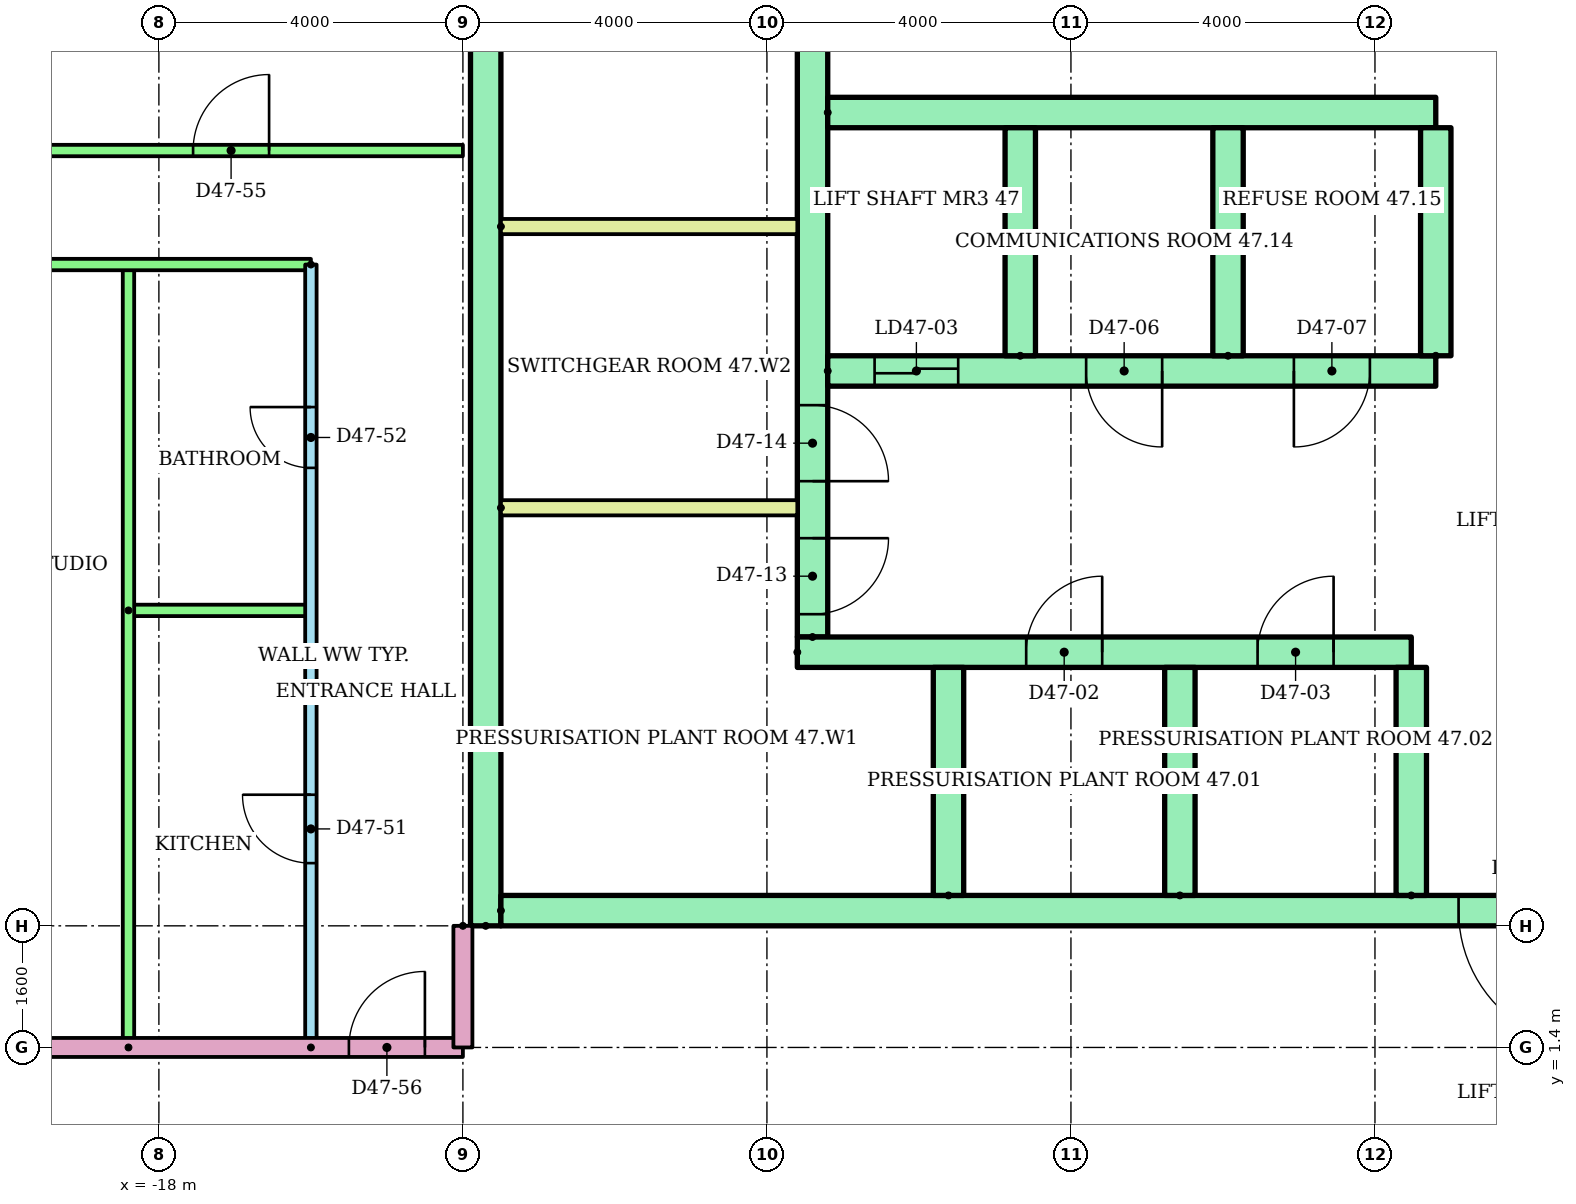
"""IFC4 building model, lengths in metres.
Left out: names, types, materials, properties, quantities, classifications, styles, units other than length and angle.
Written with IfcOpenShell. Run it as: python <this file> out.ifc"""

import sys

from ifc_helpers import new_model, si_unit, direction, frame, frame_2d, origin, place, context, subcontext, project, spatial, rectangle, extrude, element, fill, save


model = new_model("IFC4")
c1 = context("Model", 3, precision=1e-05, world=origin(), true_north=direction((0.0, 1.0)))
c2 = subcontext(c1, "Body", "Model", "MODEL_VIEW")
j1 = project(units=[si_unit("LENGTHUNIT", "METRE"), si_unit("PLANEANGLEUNIT", "RADIAN")], contexts=[c1])
p1 = place(None, origin())
s1 = spatial("IfcSite", under=j1, at=p1, CompositionType="ELEMENT")
p2 = place(p1, origin())
s2 = spatial("IfcBuilding", under=s1, at=p2, CompositionType="ELEMENT")
p3 = place(p2, frame((0.0, 0.0, 181.3)))
s3 = spatial("IfcBuildingStorey", under=s2, at=p3, CompositionType="ELEMENT", Elevation=181.3)
p4 = place(p3, frame((-13.7, 3.0, 0.0), z_axis=(0.0, 0.0, 1.0), x_axis=(0.0, 1.0, 0.0)))
e1 = element("IfcWall", 1, at=p4, inside=s3, PredefinedType="SHEAR", context=c2, shape_type="SweptSolid", body=[
    extrude(rectangle(XDim=17.0, YDim=0.4, at=frame_2d((8.5, 0.0))), origin(), (0.0, 0.0, 1.0), 2.92),
])
p5 = place(p3, frame((-9.4, 6.8, 0.0), z_axis=(0.0, 0.0, 1.0), x_axis=(0.0, 1.0, 0.0)))
e2 = element("IfcWall", 2, at=p5, inside=s3, PredefinedType="SHEAR", context=c2, shape_type="SweptSolid", body=[
    extrude(rectangle(XDim=12.7, YDim=0.4, at=frame_2d((6.35, 0.0))), origin(), (0.0, 0.0, 1.0), 2.92),
])
p6 = place(p5, frame((0.3, 0.0, 0.0)))
e3 = element("IfcOpeningElement", 3, at=p6, cuts=e2, PredefinedType="OPENING", context=c2, shape_type="SweptSolid", body=[
    extrude(rectangle(XDim=1.0, YDim=2.1, at=frame_2d((0.5, 1.05))), frame((0.0, 0.21, 0.0), z_axis=(0.0, -1.0, 0.0), x_axis=(1.0, 0.0, 0.0)), (0.0, 0.0, 1.0), 0.42),
])
p7 = place(p5, frame((2.05, 0.0, 0.0)))
e4 = element("IfcOpeningElement", 4, at=p7, cuts=e2, PredefinedType="OPENING", context=c2, shape_type="SweptSolid", body=[
    extrude(rectangle(XDim=1.0, YDim=2.1, at=frame_2d((0.5, 1.05))), frame((0.0, 0.21, 0.0), z_axis=(0.0, -1.0, 0.0), x_axis=(1.0, 0.0, 0.0)), (0.0, 0.0, 1.0), 0.42),
])
p8 = place(p5, frame((7.925, 0.0, 0.0)))
e5 = element("IfcOpeningElement", 5, at=p8, cuts=e2, PredefinedType="OPENING", context=c2, shape_type="SweptSolid", body=[
    extrude(rectangle(XDim=1.0, YDim=2.1, at=frame_2d((0.5, 1.05))), frame((0.0, 0.21, 0.0), z_axis=(0.0, -1.0, 0.0), x_axis=(1.0, 0.0, 0.0)), (0.0, 0.0, 1.0), 0.42),
])
p9 = place(p3, frame((-13.5, 3.2, 0.0)))
e6 = element("IfcWall", 6, at=p9, inside=s3, PredefinedType="SHEAR", context=c2, shape_type="SweptSolid", body=[
    extrude(rectangle(XDim=27.0, YDim=0.4, at=frame_2d((13.5, 0.0))), origin(), (0.0, 0.0, 1.0), 2.92),
])
p10 = place(p9, frame((22.083, 0.0, 0.0)))
e7 = element("IfcOpeningElement", 7, at=p10, cuts=e6, PredefinedType="OPENING", context=c2, shape_type="SweptSolid", body=[
    extrude(rectangle(XDim=1.1, YDim=2.1, at=frame_2d((0.55, 1.05))), frame((0.0, 0.21, 0.0), z_axis=(0.0, -1.0, 0.0), x_axis=(1.0, 0.0, 0.0)), (0.0, 0.0, 1.0), 0.42),
])
p11 = place(p9, frame((25.128, 0.0, 0.0)))
e8 = element("IfcOpeningElement", 8, at=p11, cuts=e6, PredefinedType="OPENING", context=c2, shape_type="SweptSolid", body=[
    extrude(rectangle(XDim=1.1, YDim=2.1, at=frame_2d((0.55, 1.05))), frame((0.0, 0.21, 0.0), z_axis=(0.0, -1.0, 0.0), x_axis=(1.0, 0.0, 0.0)), (0.0, 0.0, 1.0), 0.42),
])
p12 = place(p9, frame((12.6, 0.0, 0.0)))
e9 = element("IfcOpeningElement", 9, at=p12, cuts=e6, PredefinedType="OPENING", context=c2, shape_type="SweptSolid", body=[
    extrude(rectangle(XDim=1.8, YDim=2.1, at=frame_2d((0.9, 1.05))), frame((0.0, 0.21, 0.0), z_axis=(0.0, -1.0, 0.0), x_axis=(1.0, 0.0, 0.0)), (0.0, 0.0, 1.0), 0.42),
])
p13 = place(p3, frame((-9.6, 6.6, 0.0)))
e10 = element("IfcWall", 10, at=p13, inside=s3, PredefinedType="SHEAR", context=c2, shape_type="SweptSolid", body=[
    extrude(rectangle(XDim=8.078, YDim=0.4, at=frame_2d((4.039, 0.0))), origin(), (0.0, 0.0, 1.0), 2.92),
])
p14 = place(p13, frame((3.011, 0.0, 0.0)))
e11 = element("IfcOpeningElement", 11, at=p14, cuts=e10, PredefinedType="OPENING", context=c2, shape_type="SweptSolid", body=[
    extrude(rectangle(XDim=1.0, YDim=2.1, at=frame_2d((0.5, 1.05))), frame((0.0, 0.21, 0.0), z_axis=(0.0, -1.0, 0.0), x_axis=(1.0, 0.0, 0.0)), (0.0, 0.0, 1.0), 0.42),
])
p15 = place(p13, frame((6.056, 0.0, 0.0)))
e12 = element("IfcOpeningElement", 12, at=p15, cuts=e10, PredefinedType="OPENING", context=c2, shape_type="SweptSolid", body=[
    extrude(rectangle(XDim=1.0, YDim=2.1, at=frame_2d((0.5, 1.05))), frame((0.0, 0.21, 0.0), z_axis=(0.0, -1.0, 0.0), x_axis=(1.0, 0.0, 0.0)), (0.0, 0.0, 1.0), 0.42),
])
for number, where, z_axis, x_axis in (
    (13, (-7.611, 3.4, 0.0), (0.0, 0.0, 1.0), (0.0, 1.0, 0.0)),
    (14, (-4.567, 3.4, 0.0), (0.0, 0.0, 1.0), (0.0, 1.0, 0.0)),
    (15, (-1.522, 3.4, 0.0), (0.0, 0.0, 1.0), (0.0, 1.0, 0.0)),
):
    element("IfcWall", number, at=place(p3, frame(where, z_axis=z_axis, x_axis=x_axis)), inside=s3, PredefinedType="SHEAR", context=c2, shape_type="SweptSolid", body=[
        extrude(rectangle(XDim=3.0, YDim=0.4, at=frame_2d((1.5, 0.0))), origin(), (0.0, 0.0, 1.0), 2.92),
    ])
p16 = place(p3, frame((-9.2, 10.3, 0.0)))
e16 = element("IfcWall", 16, at=p16, inside=s3, PredefinedType="SHEAR", context=c2, shape_type="SweptSolid", body=[
    extrude(rectangle(XDim=8.0, YDim=0.4, at=frame_2d((4.0, 0.0))), origin(), (0.0, 0.0, 1.0), 2.92),
])
p17 = place(p16, frame((0.617, 0.0, 0.0)))
e17 = element("IfcOpeningElement", 17, at=p17, cuts=e16, PredefinedType="OPENING", context=c2, shape_type="SweptSolid", body=[
    extrude(rectangle(XDim=1.1, YDim=2.1, at=frame_2d((0.55, 1.05))), frame((0.0, 0.21, 0.0), z_axis=(0.0, -1.0, 0.0), x_axis=(1.0, 0.0, 0.0)), (0.0, 0.0, 1.0), 0.42),
])
p18 = place(p16, frame((3.4, 0.0, 0.0)))
e18 = element("IfcOpeningElement", 18, at=p18, cuts=e16, PredefinedType="OPENING", context=c2, shape_type="SweptSolid", body=[
    extrude(rectangle(XDim=1.0, YDim=2.1, at=frame_2d((0.5, 1.05))), frame((0.0, 0.21, 0.0), z_axis=(0.0, -1.0, 0.0), x_axis=(1.0, 0.0, 0.0)), (0.0, 0.0, 1.0), 0.42),
])
p19 = place(p16, frame((6.133, 0.0, 0.0)))
e19 = element("IfcOpeningElement", 19, at=p19, cuts=e16, PredefinedType="OPENING", context=c2, shape_type="SweptSolid", body=[
    extrude(rectangle(XDim=1.0, YDim=2.1, at=frame_2d((0.5, 1.05))), frame((0.0, 0.21, 0.0), z_axis=(0.0, -1.0, 0.0), x_axis=(1.0, 0.0, 0.0)), (0.0, 0.0, 1.0), 0.42),
])
p20 = place(p3, frame((-9.2, 13.7, 0.0)))
e20 = element("IfcWall", 20, at=p20, inside=s3, PredefinedType="SHEAR", context=c2, shape_type="SweptSolid", body=[
    extrude(rectangle(XDim=8.0, YDim=0.4, at=frame_2d((4.0, 0.0))), origin(), (0.0, 0.0, 1.0), 2.92),
])
for number, where, z_axis, x_axis in (
    (21, (-6.667, 10.5, 0.0), (0.0, 0.0, 1.0), (0.0, 1.0, 0.0)),
    (22, (-3.933, 10.5, 0.0), (0.0, 0.0, 1.0), (0.0, 1.0, 0.0)),
    (23, (-1.2, 10.5, 0.0), (0.0, 0.0, 1.0), (0.0, 1.0, 0.0)),
):
    element("IfcWall", number, at=place(p3, frame(where, z_axis=z_axis, x_axis=x_axis)), inside=s3, PredefinedType="SHEAR", context=c2, shape_type="SweptSolid", body=[
        extrude(rectangle(XDim=3.0, YDim=0.4, at=frame_2d((1.5, 0.0))), origin(), (0.0, 0.0, 1.0), 2.92),
    ])
for number, where in (
    (24, (-13.5, 8.5, 0.0)),
    (25, (-13.5, 12.2, 0.0)),
):
    element("IfcWall", number, at=place(p3, frame(where)), inside=s3, PredefinedType="PARTITIONING", context=c2, shape_type="SweptSolid", body=[
        extrude(rectangle(XDim=3.9, YDim=0.2, at=frame_2d((1.95, 0.0))), origin(), (0.0, 0.0, 1.0), 2.92),
    ])
p21 = place(p3, frame((-16.0, 1.4, 0.0), z_axis=(0.0, 0.0, 1.0), x_axis=(0.0, 1.0, 0.0)))
e26 = element("IfcWall", 26, at=p21, inside=s3, PredefinedType="PARTITIONING", context=c2, shape_type="SweptSolid", body=[
    extrude(rectangle(XDim=10.3, YDim=0.15, at=frame_2d((5.15, 0.0))), origin(), (0.0, 0.0, 1.0), 2.4),
])
p22 = place(p21, frame((2.425, 0.0, 0.0)))
e27 = element("IfcOpeningElement", 27, at=p22, cuts=e26, PredefinedType="OPENING", context=c2, shape_type="SweptSolid", body=[
    extrude(rectangle(XDim=0.9, YDim=2.1, at=frame_2d((0.45, 1.05))), frame((0.0, 0.085, 0.0), z_axis=(0.0, -1.0, 0.0), x_axis=(1.0, 0.0, 0.0)), (0.0, 0.0, 1.0), 0.17),
])
p23 = place(p21, frame((7.625, 0.0, 0.0)))
e28 = element("IfcOpeningElement", 28, at=p23, cuts=e26, PredefinedType="OPENING", context=c2, shape_type="SweptSolid", body=[
    extrude(rectangle(XDim=0.8, YDim=2.1, at=frame_2d((0.4, 1.05))), frame((0.0, 0.085, 0.0), z_axis=(0.0, -1.0, 0.0), x_axis=(1.0, 0.0, 0.0)), (0.0, 0.0, 1.0), 0.17),
])
p24 = place(p3, frame((-18.4, 7.15, 0.0)))
e29 = element("IfcWall", 29, at=p24, inside=s3, PredefinedType="PARTITIONING", context=c2, shape_type="SweptSolid", body=[
    extrude(rectangle(XDim=2.4, YDim=0.15, at=frame_2d((1.2, 0.0))), origin(), (0.0, 0.0, 1.0), 2.4),
])
p25 = place(p3, frame((-18.4, 1.4, 0.0), z_axis=(0.0, 0.0, 1.0), x_axis=(0.0, 1.0, 0.0)))
e30 = element("IfcWall", 30, at=p25, inside=s3, PredefinedType="PARTITIONING", context=c2, shape_type="SweptSolid", body=[
    extrude(rectangle(XDim=10.3, YDim=0.15, at=frame_2d((5.15, 0.0))), origin(), (0.0, 0.0, 1.0), 2.4),
])
p26 = place(p3, frame((-16.0, 11.7, 0.0), z_axis=(0.0, 0.0, 1.0), x_axis=(-1.0, 0.0, 0.0)))
e31 = element("IfcWall", 31, at=p26, inside=s3, PredefinedType="PARTITIONING", context=c2, shape_type="SweptSolid", body=[
    extrude(rectangle(XDim=8.82, YDim=0.15, at=frame_2d((4.41, 0.0))), origin(), (0.0, 0.0, 1.0), 2.4),
])
p27 = place(p26, frame((4.553, 0.0, 0.0)))
e32 = element("IfcOpeningElement", 32, at=p27, cuts=e31, PredefinedType="OPENING", context=c2, shape_type="SweptSolid", body=[
    extrude(rectangle(XDim=0.9, YDim=2.1, at=frame_2d((0.45, 1.05))), frame((0.0, 0.085, 0.0), z_axis=(0.0, -1.0, 0.0), x_axis=(1.0, 0.0, 0.0)), (0.0, 0.0, 1.0), 0.17),
])
p28 = place(p3, frame((-24.82, 13.2, 0.0)))
e33 = element("IfcWall", 33, at=p28, inside=s3, PredefinedType="PARTITIONING", context=c2, shape_type="SweptSolid", body=[
    extrude(rectangle(XDim=10.82, YDim=0.15, at=frame_2d((5.41, 0.0))), origin(), (0.0, 0.0, 1.0), 2.4),
])
p29 = place(p28, frame((1.97, 0.0, 0.0)))
e34 = element("IfcOpeningElement", 34, at=p29, cuts=e33, PredefinedType="OPENING", context=c2, shape_type="SweptSolid", body=[
    extrude(rectangle(XDim=1.0, YDim=2.1, at=frame_2d((0.5, 1.05))), frame((0.0, 0.085, 0.0), z_axis=(0.0, -1.0, 0.0), x_axis=(1.0, 0.0, 0.0)), (0.0, 0.0, 1.0), 0.17),
])
p30 = place(p28, frame((7.27, 0.0, 0.0)))
e35 = element("IfcOpeningElement", 35, at=p30, cuts=e33, PredefinedType="OPENING", context=c2, shape_type="SweptSolid", body=[
    extrude(rectangle(XDim=1.0, YDim=2.1, at=frame_2d((0.5, 1.05))), frame((0.0, 0.085, 0.0), z_axis=(0.0, -1.0, 0.0), x_axis=(1.0, 0.0, 0.0)), (0.0, 0.0, 1.0), 0.17),
])
p31 = place(p3, frame((-24.82, 1.4, 0.0)))
e36 = element("IfcWall", 36, at=p31, inside=s3, PredefinedType="PARTITIONING", context=c2, shape_type="SweptSolid", body=[
    extrude(rectangle(XDim=10.82, YDim=0.25, at=frame_2d((5.41, 0.0))), origin(), (0.0, 0.0, 1.0), 2.4),
])
p32 = place(p31, frame((9.32, 0.0, 0.0)))
e37 = element("IfcOpeningElement", 37, at=p32, cuts=e36, PredefinedType="OPENING", context=c2, shape_type="SweptSolid", body=[
    extrude(rectangle(XDim=1.0, YDim=2.1, at=frame_2d((0.5, 1.05))), frame((0.0, 0.135, 0.0), z_axis=(0.0, -1.0, 0.0), x_axis=(1.0, 0.0, 0.0)), (0.0, 0.0, 1.0), 0.27),
])
p33 = place(p3, frame((-14.0, 3.0, 0.0), z_axis=(0.0, 0.0, 1.0), x_axis=(0.0, -1.0, 0.0)))
e38 = element("IfcWall", 38, at=p33, inside=s3, PredefinedType="PARTITIONING", context=c2, shape_type="SweptSolid", body=[
    extrude(rectangle(XDim=1.6, YDim=0.25, at=frame_2d((0.8, 0.0))), origin(), (0.0, 0.0, 1.0), 2.4),
])
p34 = place(p12, frame((1.8, 0.0, 0.0), z_axis=(0.0, 0.0, 1.0), x_axis=(-1.0, 0.0, 0.0)))
e39 = element("IfcDoor", 39, at=p34, inside=s3, OperationType="DOUBLE_DOOR_SINGLE_SWING", PredefinedType="DOOR", context=c2, shape_type="SweptSolid", body=[
    extrude(rectangle(XDim=1.8, YDim=2.1, at=frame_2d((0.9, 1.05))), frame((0.0, 0.025, 0.0), z_axis=(0.0, -1.0, 0.0), x_axis=(1.0, 0.0, 0.0)), (0.0, 0.0, 1.0), 0.05),
])
fill(e9, e39)
p35 = place(p14, origin())
e40 = element("IfcDoor", 40, at=p35, inside=s3, OperationType="SINGLE_SWING_RIGHT", PredefinedType="DOOR", context=c2, shape_type="SweptSolid", body=[
    extrude(rectangle(XDim=1.0, YDim=2.1, at=frame_2d((0.5, 1.05))), frame((0.0, 0.025, 0.0), z_axis=(0.0, -1.0, 0.0), x_axis=(1.0, 0.0, 0.0)), (0.0, 0.0, 1.0), 0.05),
])
fill(e11, e40)
p36 = place(p15, origin())
e41 = element("IfcDoor", 41, at=p36, inside=s3, OperationType="SINGLE_SWING_RIGHT", PredefinedType="DOOR", context=c2, shape_type="SweptSolid", body=[
    extrude(rectangle(XDim=1.0, YDim=2.1, at=frame_2d((0.5, 1.05))), frame((0.0, 0.025, 0.0), z_axis=(0.0, -1.0, 0.0), x_axis=(1.0, 0.0, 0.0)), (0.0, 0.0, 1.0), 0.05),
])
fill(e12, e41)
p37 = place(p17, origin())
e42 = element("IfcDoor", 42, at=p37, inside=s3, OperationType="SLIDING_TO_LEFT", PredefinedType="DOOR", context=c2, shape_type="SweptSolid", body=[
    extrude(rectangle(XDim=1.1, YDim=2.1, at=frame_2d((0.55, 1.05))), frame((0.0, 0.025, 0.0), z_axis=(0.0, -1.0, 0.0), x_axis=(1.0, 0.0, 0.0)), (0.0, 0.0, 1.0), 0.05),
])
fill(e17, e42)
p38 = place(p18, frame((1.0, 0.0, 0.0), z_axis=(0.0, 0.0, 1.0), x_axis=(-1.0, 0.0, 0.0)))
e43 = element("IfcDoor", 43, at=p38, inside=s3, OperationType="SINGLE_SWING_RIGHT", PredefinedType="DOOR", context=c2, shape_type="SweptSolid", body=[
    extrude(rectangle(XDim=1.0, YDim=2.1, at=frame_2d((0.5, 1.05))), frame((0.0, 0.025, 0.0), z_axis=(0.0, -1.0, 0.0), x_axis=(1.0, 0.0, 0.0)), (0.0, 0.0, 1.0), 0.05),
])
fill(e18, e43)
p39 = place(p19, frame((1.0, 0.0, 0.0), z_axis=(0.0, 0.0, 1.0), x_axis=(-1.0, 0.0, 0.0)))
e44 = element("IfcDoor", 44, at=p39, inside=s3, OperationType="SINGLE_SWING_LEFT", PredefinedType="DOOR", context=c2, shape_type="SweptSolid", body=[
    extrude(rectangle(XDim=1.0, YDim=2.1, at=frame_2d((0.5, 1.05))), frame((0.0, 0.025, 0.0), z_axis=(0.0, -1.0, 0.0), x_axis=(1.0, 0.0, 0.0)), (0.0, 0.0, 1.0), 0.05),
])
fill(e19, e44)
p40 = place(p6, frame((1.0, 0.0, 0.0), z_axis=(0.0, 0.0, 1.0), x_axis=(-1.0, 0.0, 0.0)))
e45 = element("IfcDoor", 45, at=p40, inside=s3, OperationType="SINGLE_SWING_RIGHT", PredefinedType="DOOR", context=c2, shape_type="SweptSolid", body=[
    extrude(rectangle(XDim=1.0, YDim=2.1, at=frame_2d((0.5, 1.05))), frame((0.0, 0.025, 0.0), z_axis=(0.0, -1.0, 0.0), x_axis=(1.0, 0.0, 0.0)), (0.0, 0.0, 1.0), 0.05),
])
fill(e3, e45)
p41 = place(p7, frame((1.0, 0.0, 0.0), z_axis=(0.0, 0.0, 1.0), x_axis=(-1.0, 0.0, 0.0)))
e46 = element("IfcDoor", 46, at=p41, inside=s3, OperationType="SINGLE_SWING_LEFT", PredefinedType="DOOR", context=c2, shape_type="SweptSolid", body=[
    extrude(rectangle(XDim=1.0, YDim=2.1, at=frame_2d((0.5, 1.05))), frame((0.0, 0.025, 0.0), z_axis=(0.0, -1.0, 0.0), x_axis=(1.0, 0.0, 0.0)), (0.0, 0.0, 1.0), 0.05),
])
fill(e4, e46)
p42 = place(p22, origin())
e47 = element("IfcDoor", 47, at=p42, inside=s3, OperationType="SINGLE_SWING_RIGHT", PredefinedType="DOOR", context=c2, shape_type="SweptSolid", body=[
    extrude(rectangle(XDim=0.9, YDim=2.1, at=frame_2d((0.45, 1.05))), frame((0.0, 0.025, 0.0), z_axis=(0.0, -1.0, 0.0), x_axis=(1.0, 0.0, 0.0)), (0.0, 0.0, 1.0), 0.05),
])
fill(e27, e47)
p43 = place(p23, origin())
e48 = element("IfcDoor", 48, at=p43, inside=s3, OperationType="SINGLE_SWING_RIGHT", PredefinedType="DOOR", context=c2, shape_type="SweptSolid", body=[
    extrude(rectangle(XDim=0.8, YDim=2.1, at=frame_2d((0.4, 1.05))), frame((0.0, 0.025, 0.0), z_axis=(0.0, -1.0, 0.0), x_axis=(1.0, 0.0, 0.0)), (0.0, 0.0, 1.0), 0.05),
])
fill(e28, e48)
p44 = place(p30, origin())
e49 = element("IfcDoor", 49, at=p44, inside=s3, OperationType="SINGLE_SWING_RIGHT", PredefinedType="DOOR", context=c2, shape_type="SweptSolid", body=[
    extrude(rectangle(XDim=1.0, YDim=2.1, at=frame_2d((0.5, 1.05))), frame((0.0, 0.025, 0.0), z_axis=(0.0, -1.0, 0.0), x_axis=(1.0, 0.0, 0.0)), (0.0, 0.0, 1.0), 0.05),
])
fill(e35, e49)
p45 = place(p32, origin())
e50 = element("IfcDoor", 50, at=p45, inside=s3, OperationType="SINGLE_SWING_RIGHT", PredefinedType="DOOR", context=c2, shape_type="SweptSolid", body=[
    extrude(rectangle(XDim=1.0, YDim=2.1, at=frame_2d((0.5, 1.05))), frame((0.0, 0.025, 0.0), z_axis=(0.0, -1.0, 0.0), x_axis=(1.0, 0.0, 0.0)), (0.0, 0.0, 1.0), 0.05),
])
fill(e37, e50)
save(model, sys.argv[1])
